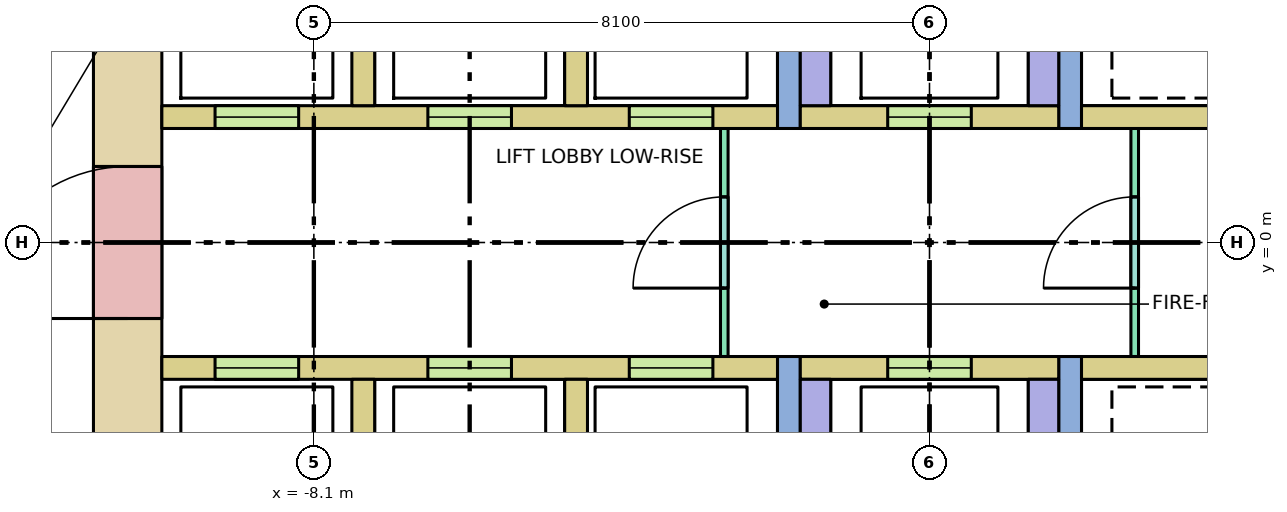
"""IFC4 building model, lengths in metres.
Left out: names, types, materials, properties, quantities, classifications, styles, units other than length and angle.
Written with IfcOpenShell. Run it as: python <this file> out.ifc"""

import sys

from ifc_helpers import new_model, si_unit, direction, frame, frame_2d, origin, place, context, subcontext, project, spatial, rectangle, extrude, element, fill, save


model = new_model("IFC4")
c1 = context("Model", 3, precision=1e-05, world=origin(), true_north=direction((0.0, 1.0)))
c2 = subcontext(c1, "Body", "Model", "MODEL_VIEW")
j1 = project(units=[si_unit("LENGTHUNIT", "METRE"), si_unit("PLANEANGLEUNIT", "RADIAN")], contexts=[c1])
p1 = place(None, origin())
s1 = spatial("IfcSite", under=j1, at=p1, CompositionType="ELEMENT")
p2 = place(p1, origin())
s2 = spatial("IfcBuilding", under=s1, at=p2, CompositionType="ELEMENT")
p3 = place(p2, frame((0.0, 0.0, 98.6)))
s3 = spatial("IfcBuildingStorey", under=s2, at=p3, CompositionType="ELEMENT", Elevation=98.6)
p4 = place(p3, frame((-10.55, -5.13, -0.28), z_axis=(0.0, 0.0, 1.0), x_axis=(0.0, 1.0, 0.0)))
e1 = element("IfcWall", 1, at=p4, inside=s3, PredefinedType="SHEAR", context=c2, shape_type="SweptSolid", body=[
    extrude(rectangle(XDim=10.26, YDim=0.9, at=frame_2d((5.13, 0.0))), origin(), (0.0, 0.0, 1.0), 4.0),
])
p5 = place(p4, frame((4.13, 0.0, 0.28)))
e2 = element("IfcOpeningElement", 2, at=p5, cuts=e1, PredefinedType="OPENING", context=c2, shape_type="SweptSolid", body=[
    extrude(rectangle(XDim=2.0, YDim=2.1, at=frame_2d((1.0, 1.05))), frame((0.0, 0.46, 0.0), z_axis=(0.0, -1.0, 0.0), x_axis=(1.0, 0.0, 0.0)), (0.0, 0.0, 1.0), 0.92),
])
p6 = place(p3, frame((-10.1, 1.65, 0.0), z_axis=(0.0, 0.0, 1.0), x_axis=(1.0, 0.0, 0.0)))
e3 = element("IfcWall", 3, at=p6, inside=s3, PredefinedType="SOLIDWALL", context=c2, shape_type="SweptSolid", body=[
    extrude(rectangle(XDim=8.1, YDim=0.3, at=frame_2d((4.05, 0.0))), origin(), (0.0, 0.0, 1.0), 3.72),
])
p7 = place(p6, frame((0.7, 0.0, 0.0)))
e4 = element("IfcOpeningElement", 4, at=p7, cuts=e3, PredefinedType="OPENING", context=c2, shape_type="SweptSolid", body=[
    extrude(rectangle(XDim=1.1, YDim=2.1, at=frame_2d((0.55, 1.05))), frame((0.0, 0.16, 0.0), z_axis=(0.0, -1.0, 0.0), x_axis=(1.0, 0.0, 0.0)), (0.0, 0.0, 1.0), 0.32),
])
p8 = place(p6, frame((3.5, 0.0, 0.0)))
e5 = element("IfcOpeningElement", 5, at=p8, cuts=e3, PredefinedType="OPENING", context=c2, shape_type="SweptSolid", body=[
    extrude(rectangle(XDim=1.1, YDim=2.1, at=frame_2d((0.55, 1.05))), frame((0.0, 0.16, 0.0), z_axis=(0.0, -1.0, 0.0), x_axis=(1.0, 0.0, 0.0)), (0.0, 0.0, 1.0), 0.32),
])
p9 = place(p6, frame((6.15, 0.0, 0.0)))
e6 = element("IfcOpeningElement", 6, at=p9, cuts=e3, PredefinedType="OPENING", context=c2, shape_type="SweptSolid", body=[
    extrude(rectangle(XDim=1.1, YDim=2.1, at=frame_2d((0.55, 1.05))), frame((0.0, 0.16, 0.0), z_axis=(0.0, -1.0, 0.0), x_axis=(1.0, 0.0, 0.0)), (0.0, 0.0, 1.0), 0.32),
])
p10 = place(p3, frame((-10.1, -1.65, 0.0), z_axis=(0.0, 0.0, 1.0), x_axis=(1.0, 0.0, 0.0)))
e7 = element("IfcWall", 7, at=p10, inside=s3, PredefinedType="SOLIDWALL", context=c2, shape_type="SweptSolid", body=[
    extrude(rectangle(XDim=8.1, YDim=0.3, at=frame_2d((4.05, 0.0))), origin(), (0.0, 0.0, 1.0), 3.72),
])
p11 = place(p10, frame((0.7, 0.0, 0.0)))
e8 = element("IfcOpeningElement", 8, at=p11, cuts=e7, PredefinedType="OPENING", context=c2, shape_type="SweptSolid", body=[
    extrude(rectangle(XDim=1.1, YDim=2.1, at=frame_2d((0.55, 1.05))), frame((0.0, 0.16, 0.0), z_axis=(0.0, -1.0, 0.0), x_axis=(1.0, 0.0, 0.0)), (0.0, 0.0, 1.0), 0.32),
])
p12 = place(p10, frame((3.5, 0.0, 0.0)))
e9 = element("IfcOpeningElement", 9, at=p12, cuts=e7, PredefinedType="OPENING", context=c2, shape_type="SweptSolid", body=[
    extrude(rectangle(XDim=1.1, YDim=2.1, at=frame_2d((0.55, 1.05))), frame((0.0, 0.16, 0.0), z_axis=(0.0, -1.0, 0.0), x_axis=(1.0, 0.0, 0.0)), (0.0, 0.0, 1.0), 0.32),
])
p13 = place(p10, frame((6.15, 0.0, 0.0)))
e10 = element("IfcOpeningElement", 10, at=p13, cuts=e7, PredefinedType="OPENING", context=c2, shape_type="SweptSolid", body=[
    extrude(rectangle(XDim=1.1, YDim=2.1, at=frame_2d((0.55, 1.05))), frame((0.0, 0.16, 0.0), z_axis=(0.0, -1.0, 0.0), x_axis=(1.0, 0.0, 0.0)), (0.0, 0.0, 1.0), 0.32),
])
for number, where, z_axis, x_axis in (
    (11, (2.0, 1.65, 0.0), (0.0, 0.0, 1.0), (1.0, 0.0, 0.0)),
    (12, (2.0, -1.65, 0.0), (0.0, 0.0, 1.0), (1.0, 0.0, 0.0)),
):
    element("IfcWall", number, at=place(p3, frame(where, z_axis=z_axis, x_axis=x_axis)), inside=s3, PredefinedType="SOLIDWALL", context=c2, shape_type="SweptSolid", body=[
        extrude(rectangle(XDim=8.1, YDim=0.3, at=frame_2d((4.05, 0.0))), origin(), (0.0, 0.0, 1.0), 3.72),
    ])
for number, where, z_axis, x_axis in (
    (13, (-7.45, 1.8, 0.0), (0.0, 0.0, 1.0), (0.0, 1.0, 0.0)),
    (14, (-7.45, -4.2, 0.0), (0.0, 0.0, 1.0), (0.0, 1.0, 0.0)),
    (15, (-4.65, 1.8, 0.0), (0.0, 0.0, 1.0), (0.0, 1.0, 0.0)),
    (16, (-4.65, -4.2, 0.0), (0.0, 0.0, 1.0), (0.0, 1.0, 0.0)),
):
    element("IfcWall", number, at=place(p3, frame(where, z_axis=z_axis, x_axis=x_axis)), inside=s3, PredefinedType="SOLIDWALL", context=c2, shape_type="SweptSolid", body=[
        extrude(rectangle(XDim=2.4, YDim=0.3, at=frame_2d((1.2, 0.0))), origin(), (0.0, 0.0, 1.0), 3.72),
    ])
for number, where, z_axis, x_axis in (
    (17, (-1.85, 1.5, 0.0), (0.0, 0.0, 1.0), (0.0, 1.0, 0.0)),
    (18, (-1.85, -8.1, 0.0), (0.0, 0.0, 1.0), (0.0, 1.0, 0.0)),
    (19, (1.85, 1.5, 0.0), (0.0, 0.0, 1.0), (0.0, 1.0, 0.0)),
    (20, (1.85, -8.1, 0.0), (0.0, 0.0, 1.0), (0.0, 1.0, 0.0)),
):
    element("IfcWall", number, at=place(p3, frame(where, z_axis=z_axis, x_axis=x_axis)), inside=s3, PredefinedType="SHEAR", context=c2, shape_type="SweptSolid", body=[
        extrude(rectangle(XDim=6.6, YDim=0.3, at=frame_2d((3.3, 0.0))), origin(), (0.0, 0.0, 1.0), 3.72),
    ])
p14 = place(p3, frame((-1.7, 1.65, 0.0), z_axis=(0.0, 0.0, 1.0), x_axis=(1.0, 0.0, 0.0)))
e21 = element("IfcWall", 21, at=p14, inside=s3, PredefinedType="SOLIDWALL", context=c2, shape_type="SweptSolid", body=[
    extrude(rectangle(XDim=3.4, YDim=0.3, at=frame_2d((1.7, 0.0))), origin(), (0.0, 0.0, 1.0), 3.72),
])
p15 = place(p14, frame((1.15, 0.0, 0.0)))
e22 = element("IfcOpeningElement", 22, at=p15, cuts=e21, PredefinedType="OPENING", context=c2, shape_type="SweptSolid", body=[
    extrude(rectangle(XDim=1.1, YDim=2.1, at=frame_2d((0.55, 1.05))), frame((0.0, 0.16, 0.0), z_axis=(0.0, -1.0, 0.0), x_axis=(1.0, 0.0, 0.0)), (0.0, 0.0, 1.0), 0.32),
])
p16 = place(p3, frame((-1.7, -1.65, 0.0), z_axis=(0.0, 0.0, 1.0), x_axis=(1.0, 0.0, 0.0)))
e23 = element("IfcWall", 23, at=p16, inside=s3, PredefinedType="SOLIDWALL", context=c2, shape_type="SweptSolid", body=[
    extrude(rectangle(XDim=3.4, YDim=0.3, at=frame_2d((1.7, 0.0))), origin(), (0.0, 0.0, 1.0), 3.72),
])
p17 = place(p16, frame((1.15, 0.0, 0.0)))
e24 = element("IfcOpeningElement", 24, at=p17, cuts=e23, PredefinedType="OPENING", context=c2, shape_type="SweptSolid", body=[
    extrude(rectangle(XDim=1.1, YDim=2.1, at=frame_2d((0.55, 1.05))), frame((0.0, 0.16, 0.0), z_axis=(0.0, -1.0, 0.0), x_axis=(1.0, 0.0, 0.0)), (0.0, 0.0, 1.0), 0.32),
])
for number, where, z_axis, x_axis in (
    (25, (-1.5, 1.8, 0.0), (0.0, 0.0, 1.0), (0.0, 1.0, 0.0)),
    (26, (-1.5, -4.8, 0.0), (0.0, 0.0, 1.0), (0.0, 1.0, 0.0)),
    (27, (1.5, 1.8, 0.0), (0.0, 0.0, 1.0), (0.0, 1.0, 0.0)),
    (28, (1.5, -4.8, 0.0), (0.0, 0.0, 1.0), (0.0, 1.0, 0.0)),
):
    element("IfcWall", number, at=place(p3, frame(where, z_axis=z_axis, x_axis=x_axis)), inside=s3, PredefinedType="SOLIDWALL", context=c2, shape_type="SweptSolid", body=[
        extrude(rectangle(XDim=3.0, YDim=0.4, at=frame_2d((1.5, 0.0))), origin(), (0.0, 0.0, 1.0), 3.72),
    ])
p18 = place(p3, frame((-2.7, -1.5, 0.0), z_axis=(0.0, 0.0, 1.0), x_axis=(0.0, 1.0, 0.0)))
e29 = element("IfcWall", 29, at=p18, inside=s3, PredefinedType="PARTITIONING", context=c2, shape_type="SweptSolid", body=[
    extrude(rectangle(XDim=3.0, YDim=0.1, at=frame_2d((1.5, 0.0))), origin(), (0.0, 0.0, 1.0), 3.72),
])
p19 = place(p18, frame((0.9, 0.0, 0.0)))
e30 = element("IfcOpeningElement", 30, at=p19, cuts=e29, PredefinedType="OPENING", context=c2, shape_type="SweptSolid", body=[
    extrude(rectangle(XDim=1.2, YDim=2.1, at=frame_2d((0.6, 1.05))), frame((0.0, 0.06, 0.0), z_axis=(0.0, -1.0, 0.0), x_axis=(1.0, 0.0, 0.0)), (0.0, 0.0, 1.0), 0.12),
])
p20 = place(p3, frame((2.7, -1.5, 0.0), z_axis=(0.0, 0.0, 1.0), x_axis=(0.0, 1.0, 0.0)))
e31 = element("IfcWall", 31, at=p20, inside=s3, PredefinedType="PARTITIONING", context=c2, shape_type="SweptSolid", body=[
    extrude(rectangle(XDim=3.0, YDim=0.1, at=frame_2d((1.5, 0.0))), origin(), (0.0, 0.0, 1.0), 3.72),
])
p21 = place(p20, frame((0.9, 0.0, 0.0)))
e32 = element("IfcOpeningElement", 32, at=p21, cuts=e31, PredefinedType="OPENING", context=c2, shape_type="SweptSolid", body=[
    extrude(rectangle(XDim=1.2, YDim=2.1, at=frame_2d((0.6, 1.05))), frame((0.0, 0.06, 0.0), z_axis=(0.0, -1.0, 0.0), x_axis=(1.0, 0.0, 0.0)), (0.0, 0.0, 1.0), 0.12),
])
p22 = place(p7, origin())
e33 = element("IfcDoor", 33, at=p22, inside=s3, OperationType="DOUBLE_DOOR_SLIDING", PredefinedType="DOOR", context=c2, shape_type="SweptSolid", body=[
    extrude(rectangle(XDim=1.1, YDim=2.1, at=frame_2d((0.55, 1.05))), frame((0.0, 0.025, 0.0), z_axis=(0.0, -1.0, 0.0), x_axis=(1.0, 0.0, 0.0)), (0.0, 0.0, 1.0), 0.05),
])
fill(e4, e33)
p23 = place(p8, origin())
e34 = element("IfcDoor", 34, at=p23, inside=s3, OperationType="DOUBLE_DOOR_SLIDING", PredefinedType="DOOR", context=c2, shape_type="SweptSolid", body=[
    extrude(rectangle(XDim=1.1, YDim=2.1, at=frame_2d((0.55, 1.05))), frame((0.0, 0.025, 0.0), z_axis=(0.0, -1.0, 0.0), x_axis=(1.0, 0.0, 0.0)), (0.0, 0.0, 1.0), 0.05),
])
fill(e5, e34)
p24 = place(p9, origin())
e35 = element("IfcDoor", 35, at=p24, inside=s3, OperationType="DOUBLE_DOOR_SLIDING", PredefinedType="DOOR", context=c2, shape_type="SweptSolid", body=[
    extrude(rectangle(XDim=1.1, YDim=2.1, at=frame_2d((0.55, 1.05))), frame((0.0, 0.025, 0.0), z_axis=(0.0, -1.0, 0.0), x_axis=(1.0, 0.0, 0.0)), (0.0, 0.0, 1.0), 0.05),
])
fill(e6, e35)
p25 = place(p11, origin())
e36 = element("IfcDoor", 36, at=p25, inside=s3, OperationType="DOUBLE_DOOR_SLIDING", PredefinedType="DOOR", context=c2, shape_type="SweptSolid", body=[
    extrude(rectangle(XDim=1.1, YDim=2.1, at=frame_2d((0.55, 1.05))), frame((0.0, 0.025, 0.0), z_axis=(0.0, -1.0, 0.0), x_axis=(1.0, 0.0, 0.0)), (0.0, 0.0, 1.0), 0.05),
])
fill(e8, e36)
p26 = place(p12, origin())
e37 = element("IfcDoor", 37, at=p26, inside=s3, OperationType="DOUBLE_DOOR_SLIDING", PredefinedType="DOOR", context=c2, shape_type="SweptSolid", body=[
    extrude(rectangle(XDim=1.1, YDim=2.1, at=frame_2d((0.55, 1.05))), frame((0.0, 0.025, 0.0), z_axis=(0.0, -1.0, 0.0), x_axis=(1.0, 0.0, 0.0)), (0.0, 0.0, 1.0), 0.05),
])
fill(e9, e37)
p27 = place(p13, origin())
e38 = element("IfcDoor", 38, at=p27, inside=s3, OperationType="DOUBLE_DOOR_SLIDING", PredefinedType="DOOR", context=c2, shape_type="SweptSolid", body=[
    extrude(rectangle(XDim=1.1, YDim=2.1, at=frame_2d((0.55, 1.05))), frame((0.0, 0.025, 0.0), z_axis=(0.0, -1.0, 0.0), x_axis=(1.0, 0.0, 0.0)), (0.0, 0.0, 1.0), 0.05),
])
fill(e10, e38)
p28 = place(p15, origin())
e39 = element("IfcDoor", 39, at=p28, inside=s3, OperationType="DOUBLE_DOOR_SLIDING", PredefinedType="DOOR", context=c2, shape_type="SweptSolid", body=[
    extrude(rectangle(XDim=1.1, YDim=2.1, at=frame_2d((0.55, 1.05))), frame((0.0, 0.025, 0.0), z_axis=(0.0, -1.0, 0.0), x_axis=(1.0, 0.0, 0.0)), (0.0, 0.0, 1.0), 0.05),
])
fill(e22, e39)
p29 = place(p17, origin())
e40 = element("IfcDoor", 40, at=p29, inside=s3, OperationType="DOUBLE_DOOR_SLIDING", PredefinedType="DOOR", context=c2, shape_type="SweptSolid", body=[
    extrude(rectangle(XDim=1.1, YDim=2.1, at=frame_2d((0.55, 1.05))), frame((0.0, 0.025, 0.0), z_axis=(0.0, -1.0, 0.0), x_axis=(1.0, 0.0, 0.0)), (0.0, 0.0, 1.0), 0.05),
])
fill(e24, e40)
p30 = place(p5, origin())
e41 = element("IfcDoor", 41, at=p30, inside=s3, OperationType="DOUBLE_DOOR_SINGLE_SWING", PredefinedType="DOOR", context=c2, shape_type="SweptSolid", body=[
    extrude(rectangle(XDim=2.0, YDim=2.1, at=frame_2d((1.0, 1.05))), frame((0.0, 0.025, 0.0), z_axis=(0.0, -1.0, 0.0), x_axis=(1.0, 0.0, 0.0)), (0.0, 0.0, 1.0), 0.05),
])
fill(e2, e41)
p31 = place(p19, origin())
e42 = element("IfcDoor", 42, at=p31, inside=s3, OperationType="SINGLE_SWING_LEFT", PredefinedType="DOOR", context=c2, shape_type="SweptSolid", body=[
    extrude(rectangle(XDim=1.2, YDim=2.1, at=frame_2d((0.6, 1.05))), frame((0.0, 0.025, 0.0), z_axis=(0.0, -1.0, 0.0), x_axis=(1.0, 0.0, 0.0)), (0.0, 0.0, 1.0), 0.05),
])
fill(e30, e42)
p32 = place(p21, origin())
e43 = element("IfcDoor", 43, at=p32, inside=s3, OperationType="SINGLE_SWING_LEFT", PredefinedType="DOOR", context=c2, shape_type="SweptSolid", body=[
    extrude(rectangle(XDim=1.2, YDim=2.1, at=frame_2d((0.6, 1.05))), frame((0.0, 0.025, 0.0), z_axis=(0.0, -1.0, 0.0), x_axis=(1.0, 0.0, 0.0)), (0.0, 0.0, 1.0), 0.05),
])
fill(e32, e43)
save(model, sys.argv[1])
